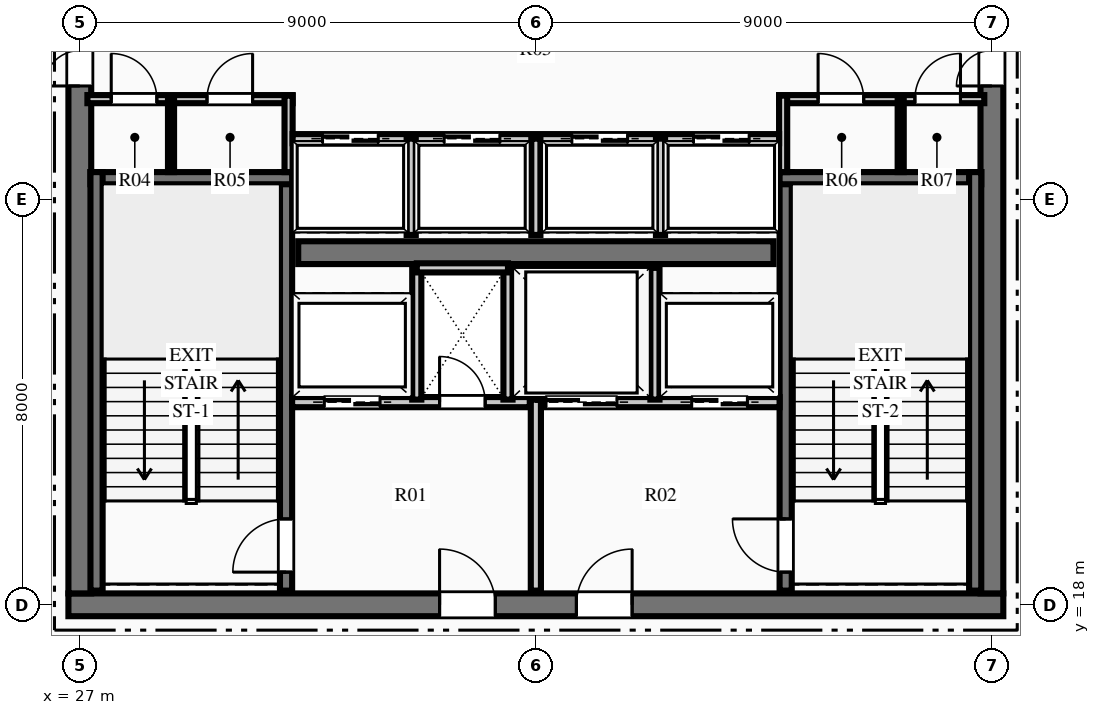
"""IFC4 building model, lengths in metres.
Left out: names, types, materials, properties, quantities, classifications, styles, units other than length and angle.
Written with IfcOpenShell. Run it as: python <this file> out.ifc"""

import sys

from ifc_helpers import new_model, si_unit, direction, frame, frame_2d, origin, place, context, subcontext, project, spatial, rectangle, extrude, element, fill, save


model = new_model("IFC4")
c1 = context("Model", 3, precision=1e-05, world=origin(), true_north=direction((0.0, 1.0)))
c2 = subcontext(c1, "Body", "Model", "MODEL_VIEW")
j1 = project(units=[si_unit("LENGTHUNIT", "METRE"), si_unit("PLANEANGLEUNIT", "RADIAN")], contexts=[c1])
p1 = place(None, origin())
s1 = spatial("IfcSite", under=j1, at=p1, CompositionType="ELEMENT")
p2 = place(p1, origin())
s2 = spatial("IfcBuilding", under=s1, at=p2, CompositionType="ELEMENT")
p3 = place(p2, frame((0.0, 0.0, 271.2)))
s3 = spatial("IfcBuildingStorey", under=s2, at=p3, CompositionType="ELEMENT", Elevation=271.2)
p4 = place(p3, frame((26.775, 18.0, 0.0), z_axis=(0.0, 0.0, 1.0), x_axis=(1.0, 0.0, 0.0)))
e1 = element("IfcWall", 1, at=p4, inside=s3, PredefinedType="SHEAR", context=c2, shape_type="SweptSolid", body=[
    extrude(rectangle(XDim=18.45, YDim=0.45, at=frame_2d((9.225, 0.0))), origin(), (0.0, 0.0, 1.0), 3.75),
])
p5 = place(p4, frame((7.325, 0.0, 0.0)))
e2 = element("IfcOpeningElement", 2, at=p5, cuts=e1, PredefinedType="OPENING", context=c2, shape_type="SweptSolid", body=[
    extrude(rectangle(XDim=1.1, YDim=2.15, at=frame_2d((0.55, 1.075))), frame((0.0, 0.235, 0.0), z_axis=(0.0, -1.0, 0.0), x_axis=(1.0, 0.0, 0.0)), (0.0, 0.0, 1.0), 0.47),
])
p6 = place(p4, frame((10.025, 0.0, 0.0)))
e3 = element("IfcOpeningElement", 3, at=p6, cuts=e1, PredefinedType="OPENING", context=c2, shape_type="SweptSolid", body=[
    extrude(rectangle(XDim=1.1, YDim=2.15, at=frame_2d((0.55, 1.075))), frame((0.0, 0.235, 0.0), z_axis=(0.0, -1.0, 0.0), x_axis=(1.0, 0.0, 0.0)), (0.0, 0.0, 1.0), 0.47),
])
p7 = place(p3, frame((27.0, 18.225, 0.0), z_axis=(0.0, 0.0, 1.0), x_axis=(0.0, 1.0, 0.0)))
e4 = element("IfcWall", 4, at=p7, inside=s3, PredefinedType="SHEAR", context=c2, shape_type="SweptSolid", body=[
    extrude(rectangle(XDim=15.55, YDim=0.45, at=frame_2d((7.775, 0.0))), origin(), (0.0, 0.0, 1.0), 3.75),
])
p8 = place(p7, frame((10.015, 0.0, 0.0)))
e5 = element("IfcOpeningElement", 5, at=p8, cuts=e4, PredefinedType="OPENING", context=c2, shape_type="SweptSolid", body=[
    extrude(rectangle(XDim=1.4, YDim=2.2, at=frame_2d((0.7, 1.1))), frame((0.0, 0.235, 0.0), z_axis=(0.0, -1.0, 0.0), x_axis=(1.0, 0.0, 0.0)), (0.0, 0.0, 1.0), 0.47),
])
p9 = place(p3, frame((45.0, 18.225, 0.0), z_axis=(0.0, 0.0, 1.0), x_axis=(0.0, 1.0, 0.0)))
e6 = element("IfcWall", 6, at=p9, inside=s3, PredefinedType="SHEAR", context=c2, shape_type="SweptSolid", body=[
    extrude(rectangle(XDim=15.55, YDim=0.45, at=frame_2d((7.775, 0.0))), origin(), (0.0, 0.0, 1.0), 3.75),
])
p10 = place(p9, frame((10.015, 0.0, 0.0)))
e7 = element("IfcOpeningElement", 7, at=p10, cuts=e6, PredefinedType="OPENING", context=c2, shape_type="SweptSolid", body=[
    extrude(rectangle(XDim=1.4, YDim=2.2, at=frame_2d((0.7, 1.1))), frame((0.0, 0.235, 0.0), z_axis=(0.0, -1.0, 0.0), x_axis=(1.0, 0.0, 0.0)), (0.0, 0.0, 1.0), 0.47),
])
p11 = place(p3, frame((31.31, 24.95, 0.0), z_axis=(0.0, 0.0, 1.0), x_axis=(1.0, 0.0, 0.0)))
e8 = element("IfcWall", 8, at=p11, inside=s3, PredefinedType="SHEAR", context=c2, shape_type="SweptSolid", body=[
    extrude(rectangle(XDim=9.38, YDim=0.45, at=frame_2d((4.69, 0.0))), origin(), (0.0, 0.0, 1.0), 3.75),
])
p12 = place(p3, frame((31.07, 18.28, 0.0), z_axis=(0.0, 0.0, 1.0), x_axis=(0.0, 1.0, 0.0)))
e9 = element("IfcWall", 9, at=p12, inside=s3, PredefinedType="SHEAR", context=c2, shape_type="SweptSolid", body=[
    extrude(rectangle(XDim=8.26, YDim=0.24, at=frame_2d((4.13, 0.0))), origin(), (0.0, 0.0, 1.0), 3.75),
])
p13 = place(p12, frame((0.365, 0.0, 0.0)))
e10 = element("IfcOpeningElement", 10, at=p13, cuts=e9, PredefinedType="OPENING", context=c2, shape_type="SweptSolid", body=[
    extrude(rectangle(XDim=1.05, YDim=2.15, at=frame_2d((0.525, 1.075))), frame((0.0, 0.13, 0.0), z_axis=(0.0, -1.0, 0.0), x_axis=(1.0, 0.0, 0.0)), (0.0, 0.0, 1.0), 0.26),
])
p14 = place(p3, frame((27.21, 26.42, 0.0), z_axis=(0.0, 0.0, 1.0), x_axis=(1.0, 0.0, 0.0)))
e11 = element("IfcWall", 11, at=p14, inside=s3, PredefinedType="SHEAR", context=c2, shape_type="SweptSolid", body=[
    extrude(rectangle(XDim=3.98, YDim=0.24, at=frame_2d((1.99, 0.0))), origin(), (0.0, 0.0, 1.0), 3.75),
])
p15 = place(p3, frame((27.33, 18.28, 0.0), z_axis=(0.0, 0.0, 1.0), x_axis=(0.0, 1.0, 0.0)))
e12 = element("IfcWall", 12, at=p15, inside=s3, PredefinedType="SHEAR", context=c2, shape_type="SweptSolid", body=[
    extrude(rectangle(XDim=8.26, YDim=0.24, at=frame_2d((4.13, 0.0))), origin(), (0.0, 0.0, 1.0), 3.75),
])
p16 = place(p3, frame((40.93, 18.28, 0.0), z_axis=(0.0, 0.0, 1.0), x_axis=(0.0, 1.0, 0.0)))
e13 = element("IfcWall", 13, at=p16, inside=s3, PredefinedType="SHEAR", context=c2, shape_type="SweptSolid", body=[
    extrude(rectangle(XDim=8.26, YDim=0.24, at=frame_2d((4.13, 0.0))), origin(), (0.0, 0.0, 1.0), 3.75),
])
p17 = place(p16, frame((0.365, 0.0, 0.0)))
e14 = element("IfcOpeningElement", 14, at=p17, cuts=e13, PredefinedType="OPENING", context=c2, shape_type="SweptSolid", body=[
    extrude(rectangle(XDim=1.05, YDim=2.15, at=frame_2d((0.525, 1.075))), frame((0.0, 0.13, 0.0), z_axis=(0.0, -1.0, 0.0), x_axis=(1.0, 0.0, 0.0)), (0.0, 0.0, 1.0), 0.26),
])
p18 = place(p3, frame((40.81, 26.42, 0.0), z_axis=(0.0, 0.0, 1.0), x_axis=(1.0, 0.0, 0.0)))
e15 = element("IfcWall", 15, at=p18, inside=s3, PredefinedType="SHEAR", context=c2, shape_type="SweptSolid", body=[
    extrude(rectangle(XDim=3.98, YDim=0.24, at=frame_2d((1.99, 0.0))), origin(), (0.0, 0.0, 1.0), 3.75),
])
p19 = place(p3, frame((44.67, 18.28, 0.0), z_axis=(0.0, 0.0, 1.0), x_axis=(0.0, 1.0, 0.0)))
e16 = element("IfcWall", 16, at=p19, inside=s3, PredefinedType="SHEAR", context=c2, shape_type="SweptSolid", body=[
    extrude(rectangle(XDim=8.26, YDim=0.24, at=frame_2d((4.13, 0.0))), origin(), (0.0, 0.0, 1.0), 3.75),
])
p20 = place(p3, frame((36.0, 18.28, 0.0), z_axis=(0.0, 0.0, 1.0), x_axis=(0.0, 1.0, 0.0)))
e17 = element("IfcWall", 17, at=p20, inside=s3, PredefinedType="PARTITIONING", context=c2, shape_type="SweptSolid", body=[
    extrude(rectangle(XDim=3.77, YDim=0.2, at=frame_2d((1.885, 0.0))), origin(), (0.0, 0.0, 1.0), 3.48),
])
p21 = place(p3, frame((31.19, 22.0, 0.0), z_axis=(0.0, 0.0, 1.0), x_axis=(1.0, 0.0, 0.0)))
e18 = element("IfcWall", 18, at=p21, inside=s3, PredefinedType="PARTITIONING", context=c2, shape_type="SweptSolid", body=[
    extrude(rectangle(XDim=4.69, YDim=0.2, at=frame_2d((2.345, 0.0))), origin(), (0.0, 0.0, 1.0), 3.48),
])
p22 = place(p21, frame((2.91, 0.0, 0.0)))
e19 = element("IfcOpeningElement", 19, at=p22, cuts=e18, PredefinedType="OPENING", context=c2, shape_type="SweptSolid", body=[
    extrude(rectangle(XDim=0.9, YDim=2.15, at=frame_2d((0.45, 1.075))), frame((0.0, 0.11, 0.0), z_axis=(0.0, -1.0, 0.0), x_axis=(1.0, 0.0, 0.0)), (0.0, 0.0, 1.0), 0.22),
])
p23 = place(p21, frame((0.635, 0.0, 0.0)))
e20 = element("IfcOpeningElement", 20, at=p23, cuts=e18, PredefinedType="OPENING", context=c2, shape_type="SweptSolid", body=[
    extrude(rectangle(XDim=1.1, YDim=2.15, at=frame_2d((0.55, 1.075))), frame((0.0, 0.11, 0.0), z_axis=(0.0, -1.0, 0.0), x_axis=(1.0, 0.0, 0.0)), (0.0, 0.0, 1.0), 0.22),
])
p24 = place(p3, frame((36.12, 22.0, 0.0), z_axis=(0.0, 0.0, 1.0), x_axis=(1.0, 0.0, 0.0)))
e21 = element("IfcWall", 21, at=p24, inside=s3, PredefinedType="PARTITIONING", context=c2, shape_type="SweptSolid", body=[
    extrude(rectangle(XDim=4.69, YDim=0.2, at=frame_2d((2.345, 0.0))), origin(), (0.0, 0.0, 1.0), 3.48),
])
p25 = place(p24, frame((2.955, 0.0, 0.0)))
e22 = element("IfcOpeningElement", 22, at=p25, cuts=e21, PredefinedType="OPENING", context=c2, shape_type="SweptSolid", body=[
    extrude(rectangle(XDim=1.1, YDim=2.15, at=frame_2d((0.55, 1.075))), frame((0.0, 0.11, 0.0), z_axis=(0.0, -1.0, 0.0), x_axis=(1.0, 0.0, 0.0)), (0.0, 0.0, 1.0), 0.22),
])
p26 = place(p24, frame((0.08, 0.0, 0.0)))
e23 = element("IfcOpeningElement", 23, at=p26, cuts=e21, PredefinedType="OPENING", context=c2, shape_type="SweptSolid", body=[
    extrude(rectangle(XDim=1.4, YDim=2.2, at=frame_2d((0.7, 1.1))), frame((0.0, 0.11, 0.0), z_axis=(0.0, -1.0, 0.0), x_axis=(1.0, 0.0, 0.0)), (0.0, 0.0, 1.0), 0.22),
])
for number, where, z_axis, x_axis in (
    (24, (33.65, 22.05, 0.0), (0.0, 0.0, 1.0), (0.0, 1.0, 0.0)),
    (25, (35.45, 22.05, 0.0), (0.0, 0.0, 1.0), (0.0, 1.0, 0.0)),
):
    element("IfcWall", number, at=place(p3, frame(where, z_axis=z_axis, x_axis=x_axis)), inside=s3, PredefinedType="PARTITIONING", context=c2, shape_type="SweptSolid", body=[
        extrude(rectangle(XDim=2.6, YDim=0.18, at=frame_2d((1.3, 0.0))), origin(), (0.0, 0.0, 1.0), 3.48),
    ])
p27 = place(p3, frame((33.65, 24.65, 0.0), z_axis=(0.0, 0.0, 1.0), x_axis=(1.0, 0.0, 0.0)))
e26 = element("IfcWall", 26, at=p27, inside=s3, PredefinedType="PARTITIONING", context=c2, shape_type="SweptSolid", body=[
    extrude(rectangle(XDim=1.8, YDim=0.18, at=frame_2d((0.9, 0.0))), origin(), (0.0, 0.0, 1.0), 3.48),
])
p28 = place(p3, frame((38.35, 22.05, 0.0), z_axis=(0.0, 0.0, 1.0), x_axis=(0.0, 1.0, 0.0)))
e27 = element("IfcWall", 27, at=p28, inside=s3, PredefinedType="PARTITIONING", context=c2, shape_type="SweptSolid", body=[
    extrude(rectangle(XDim=2.6, YDim=0.18, at=frame_2d((1.3, 0.0))), origin(), (0.0, 0.0, 1.0), 3.48),
])
p29 = place(p3, frame((27.15, 27.98, 0.0), z_axis=(0.0, 0.0, 1.0), x_axis=(1.0, 0.0, 0.0)))
e28 = element("IfcWall", 28, at=p29, inside=s3, PredefinedType="PARTITIONING", context=c2, shape_type="SweptSolid", body=[
    extrude(rectangle(XDim=4.05, YDim=0.16, at=frame_2d((2.025, 0.0))), origin(), (0.0, 0.0, 1.0), 3.48),
])
p30 = place(p29, frame((0.47, 0.0, 0.0)))
e29 = element("IfcOpeningElement", 29, at=p30, cuts=e28, PredefinedType="OPENING", context=c2, shape_type="SweptSolid", body=[
    extrude(rectangle(XDim=0.9, YDim=2.15, at=frame_2d((0.45, 1.075))), frame((0.0, 0.09, 0.0), z_axis=(0.0, -1.0, 0.0), x_axis=(1.0, 0.0, 0.0)), (0.0, 0.0, 1.0), 0.18),
])
p31 = place(p29, frame((2.36, 0.0, 0.0)))
e30 = element("IfcOpeningElement", 30, at=p31, cuts=e28, PredefinedType="OPENING", context=c2, shape_type="SweptSolid", body=[
    extrude(rectangle(XDim=0.9, YDim=2.15, at=frame_2d((0.45, 1.075))), frame((0.0, 0.09, 0.0), z_axis=(0.0, -1.0, 0.0), x_axis=(1.0, 0.0, 0.0)), (0.0, 0.0, 1.0), 0.18),
])
p32 = place(p3, frame((31.12, 26.54, 0.0), z_axis=(0.0, 0.0, 1.0), x_axis=(0.0, 1.0, 0.0)))
e31 = element("IfcWall", 31, at=p32, inside=s3, PredefinedType="PARTITIONING", context=c2, shape_type="SweptSolid", body=[
    extrude(rectangle(XDim=1.51, YDim=0.16, at=frame_2d((0.755, 0.0))), origin(), (0.0, 0.0, 1.0), 3.48),
])
p33 = place(p3, frame((40.8, 27.98, 0.0), z_axis=(0.0, 0.0, 1.0), x_axis=(1.0, 0.0, 0.0)))
e32 = element("IfcWall", 32, at=p33, inside=s3, PredefinedType="PARTITIONING", context=c2, shape_type="SweptSolid", body=[
    extrude(rectangle(XDim=4.05, YDim=0.16, at=frame_2d((2.025, 0.0))), origin(), (0.0, 0.0, 1.0), 3.48),
])
p34 = place(p33, frame((0.77, 0.0, 0.0)))
e33 = element("IfcOpeningElement", 33, at=p34, cuts=e32, PredefinedType="OPENING", context=c2, shape_type="SweptSolid", body=[
    extrude(rectangle(XDim=0.9, YDim=2.15, at=frame_2d((0.45, 1.075))), frame((0.0, 0.09, 0.0), z_axis=(0.0, -1.0, 0.0), x_axis=(1.0, 0.0, 0.0)), (0.0, 0.0, 1.0), 0.18),
])
p35 = place(p33, frame((2.68, 0.0, 0.0)))
e34 = element("IfcOpeningElement", 34, at=p35, cuts=e32, PredefinedType="OPENING", context=c2, shape_type="SweptSolid", body=[
    extrude(rectangle(XDim=0.9, YDim=2.15, at=frame_2d((0.45, 1.075))), frame((0.0, 0.09, 0.0), z_axis=(0.0, -1.0, 0.0), x_axis=(1.0, 0.0, 0.0)), (0.0, 0.0, 1.0), 0.18),
])
p36 = place(p3, frame((40.88, 26.54, 0.0), z_axis=(0.0, 0.0, 1.0), x_axis=(0.0, 1.0, 0.0)))
e35 = element("IfcWall", 35, at=p36, inside=s3, PredefinedType="PARTITIONING", context=c2, shape_type="SweptSolid", body=[
    extrude(rectangle(XDim=1.51, YDim=0.16, at=frame_2d((0.755, 0.0))), origin(), (0.0, 0.0, 1.0), 3.48),
])
for number, where, z_axis, x_axis in (
    (36, (28.8, 26.54, 0.0), (0.0, 0.0, 1.0), (0.0, 1.0, 0.0)),
    (37, (43.2, 26.54, 0.0), (0.0, 0.0, 1.0), (0.0, 1.0, 0.0)),
):
    element("IfcWall", number, at=place(p3, frame(where, z_axis=z_axis, x_axis=x_axis)), inside=s3, PredefinedType="PARTITIONING", context=c2, shape_type="SweptSolid", body=[
        extrude(rectangle(XDim=1.44, YDim=0.12, at=frame_2d((0.72, 0.0))), origin(), (0.0, 0.0, 1.0), 3.48),
    ])
p37 = place(p3, frame((31.2, 27.2, 0.0), z_axis=(0.0, 0.0, 1.0), x_axis=(1.0, 0.0, 0.0)))
e38 = element("IfcWall", 38, at=p37, inside=s3, PredefinedType="PARTITIONING", context=c2, shape_type="SweptSolid", body=[
    extrude(rectangle(XDim=9.6, YDim=0.18, at=frame_2d((4.8, 0.0))), origin(), (0.0, 0.0, 1.0), 3.48),
])
p38 = place(p37, frame((0.59, 0.0, 0.0)))
e39 = element("IfcOpeningElement", 39, at=p38, cuts=e38, PredefinedType="OPENING", context=c2, shape_type="SweptSolid", body=[
    extrude(rectangle(XDim=1.1, YDim=2.15, at=frame_2d((0.55, 1.075))), frame((0.0, 0.1, 0.0), z_axis=(0.0, -1.0, 0.0), x_axis=(1.0, 0.0, 0.0)), (0.0, 0.0, 1.0), 0.2),
])
p39 = place(p37, frame((2.99, 0.0, 0.0)))
e40 = element("IfcOpeningElement", 40, at=p39, cuts=e38, PredefinedType="OPENING", context=c2, shape_type="SweptSolid", body=[
    extrude(rectangle(XDim=1.1, YDim=2.15, at=frame_2d((0.55, 1.075))), frame((0.0, 0.1, 0.0), z_axis=(0.0, -1.0, 0.0), x_axis=(1.0, 0.0, 0.0)), (0.0, 0.0, 1.0), 0.2),
])
p40 = place(p37, frame((5.51, 0.0, 0.0)))
e41 = element("IfcOpeningElement", 41, at=p40, cuts=e38, PredefinedType="OPENING", context=c2, shape_type="SweptSolid", body=[
    extrude(rectangle(XDim=1.1, YDim=2.15, at=frame_2d((0.55, 1.075))), frame((0.0, 0.1, 0.0), z_axis=(0.0, -1.0, 0.0), x_axis=(1.0, 0.0, 0.0)), (0.0, 0.0, 1.0), 0.2),
])
p41 = place(p37, frame((7.91, 0.0, 0.0)))
e42 = element("IfcOpeningElement", 42, at=p41, cuts=e38, PredefinedType="OPENING", context=c2, shape_type="SweptSolid", body=[
    extrude(rectangle(XDim=1.1, YDim=2.15, at=frame_2d((0.55, 1.075))), frame((0.0, 0.1, 0.0), z_axis=(0.0, -1.0, 0.0), x_axis=(1.0, 0.0, 0.0)), (0.0, 0.0, 1.0), 0.2),
])
for number, where, z_axis, x_axis in (
    (43, (33.54, 25.3, 0.0), (0.0, 0.0, 1.0), (0.0, 1.0, 0.0)),
    (44, (36.0, 25.3, 0.0), (0.0, 0.0, 1.0), (0.0, 1.0, 0.0)),
    (45, (38.46, 25.3, 0.0), (0.0, 0.0, 1.0), (0.0, 1.0, 0.0)),
):
    element("IfcWall", number, at=place(p3, frame(where, z_axis=z_axis, x_axis=x_axis)), inside=s3, PredefinedType="PARTITIONING", context=c2, shape_type="SweptSolid", body=[
        extrude(rectangle(XDim=1.9, YDim=0.18, at=frame_2d((0.95, 0.0))), origin(), (0.0, 0.0, 1.0), 3.48),
    ])
p42 = place(p30, origin())
e46 = element("IfcDoor", 46, at=p42, inside=s3, OperationType="SINGLE_SWING_LEFT", PredefinedType="DOOR", context=c2, shape_type="SweptSolid", body=[
    extrude(rectangle(XDim=0.9, YDim=2.15, at=frame_2d((0.45, 1.075))), frame((0.0, 0.025, 0.0), z_axis=(0.0, -1.0, 0.0), x_axis=(1.0, 0.0, 0.0)), (0.0, 0.0, 1.0), 0.05),
])
fill(e29, e46)
p43 = place(p31, origin())
e47 = element("IfcDoor", 47, at=p43, inside=s3, OperationType="SINGLE_SWING_RIGHT", PredefinedType="DOOR", context=c2, shape_type="SweptSolid", body=[
    extrude(rectangle(XDim=0.9, YDim=2.15, at=frame_2d((0.45, 1.075))), frame((0.0, 0.025, 0.0), z_axis=(0.0, -1.0, 0.0), x_axis=(1.0, 0.0, 0.0)), (0.0, 0.0, 1.0), 0.05),
])
fill(e30, e47)
p44 = place(p34, origin())
e48 = element("IfcDoor", 48, at=p44, inside=s3, OperationType="SINGLE_SWING_LEFT", PredefinedType="DOOR", context=c2, shape_type="SweptSolid", body=[
    extrude(rectangle(XDim=0.9, YDim=2.15, at=frame_2d((0.45, 1.075))), frame((0.0, 0.025, 0.0), z_axis=(0.0, -1.0, 0.0), x_axis=(1.0, 0.0, 0.0)), (0.0, 0.0, 1.0), 0.05),
])
fill(e33, e48)
p45 = place(p35, origin())
e49 = element("IfcDoor", 49, at=p45, inside=s3, OperationType="SINGLE_SWING_RIGHT", PredefinedType="DOOR", context=c2, shape_type="SweptSolid", body=[
    extrude(rectangle(XDim=0.9, YDim=2.15, at=frame_2d((0.45, 1.075))), frame((0.0, 0.025, 0.0), z_axis=(0.0, -1.0, 0.0), x_axis=(1.0, 0.0, 0.0)), (0.0, 0.0, 1.0), 0.05),
])
fill(e34, e49)
p46 = place(p13, origin())
e50 = element("IfcDoor", 50, at=p46, inside=s3, OperationType="SINGLE_SWING_LEFT", PredefinedType="DOOR", context=c2, shape_type="SweptSolid", body=[
    extrude(rectangle(XDim=1.05, YDim=2.15, at=frame_2d((0.525, 1.075))), frame((0.0, 0.025, 0.0), z_axis=(0.0, -1.0, 0.0), x_axis=(1.0, 0.0, 0.0)), (0.0, 0.0, 1.0), 0.05),
])
fill(e10, e50)
p47 = place(p17, origin())
e51 = element("IfcDoor", 51, at=p47, inside=s3, OperationType="SINGLE_SWING_RIGHT", PredefinedType="DOOR", context=c2, shape_type="SweptSolid", body=[
    extrude(rectangle(XDim=1.05, YDim=2.15, at=frame_2d((0.525, 1.075))), frame((0.0, 0.025, 0.0), z_axis=(0.0, -1.0, 0.0), x_axis=(1.0, 0.0, 0.0)), (0.0, 0.0, 1.0), 0.05),
])
fill(e14, e51)
p48 = place(p5, origin())
e52 = element("IfcDoor", 52, at=p48, inside=s3, OperationType="SINGLE_SWING_LEFT", PredefinedType="DOOR", context=c2, shape_type="SweptSolid", body=[
    extrude(rectangle(XDim=1.1, YDim=2.15, at=frame_2d((0.55, 1.075))), frame((0.0, 0.025, 0.0), z_axis=(0.0, -1.0, 0.0), x_axis=(1.0, 0.0, 0.0)), (0.0, 0.0, 1.0), 0.05),
])
fill(e2, e52)
p49 = place(p6, origin())
e53 = element("IfcDoor", 53, at=p49, inside=s3, OperationType="SINGLE_SWING_RIGHT", PredefinedType="DOOR", context=c2, shape_type="SweptSolid", body=[
    extrude(rectangle(XDim=1.1, YDim=2.15, at=frame_2d((0.55, 1.075))), frame((0.0, 0.025, 0.0), z_axis=(0.0, -1.0, 0.0), x_axis=(1.0, 0.0, 0.0)), (0.0, 0.0, 1.0), 0.05),
])
fill(e3, e53)
p50 = place(p22, origin())
e54 = element("IfcDoor", 54, at=p50, inside=s3, OperationType="SINGLE_SWING_LEFT", PredefinedType="DOOR", context=c2, shape_type="SweptSolid", body=[
    extrude(rectangle(XDim=0.9, YDim=2.15, at=frame_2d((0.45, 1.075))), frame((0.0, 0.025, 0.0), z_axis=(0.0, -1.0, 0.0), x_axis=(1.0, 0.0, 0.0)), (0.0, 0.0, 1.0), 0.05),
])
fill(e19, e54)
p51 = place(p8, origin())
e55 = element("IfcDoor", 55, at=p51, inside=s3, OperationType="DOUBLE_DOOR_SINGLE_SWING", PredefinedType="DOOR", context=c2, shape_type="SweptSolid", body=[
    extrude(rectangle(XDim=1.4, YDim=2.2, at=frame_2d((0.7, 1.1))), frame((0.0, 0.025, 0.0), z_axis=(0.0, -1.0, 0.0), x_axis=(1.0, 0.0, 0.0)), (0.0, 0.0, 1.0), 0.05),
])
fill(e5, e55)
p52 = place(p10, origin())
e56 = element("IfcDoor", 56, at=p52, inside=s3, OperationType="DOUBLE_DOOR_SINGLE_SWING", PredefinedType="DOOR", context=c2, shape_type="SweptSolid", body=[
    extrude(rectangle(XDim=1.4, YDim=2.2, at=frame_2d((0.7, 1.1))), frame((0.0, 0.025, 0.0), z_axis=(0.0, -1.0, 0.0), x_axis=(1.0, 0.0, 0.0)), (0.0, 0.0, 1.0), 0.05),
])
fill(e7, e56)
p53 = place(p38, origin())
e57 = element("IfcDoor", 57, at=p53, inside=s3, OperationType="SLIDING_TO_LEFT", PredefinedType="DOOR", context=c2, shape_type="SweptSolid", body=[
    extrude(rectangle(XDim=1.1, YDim=2.15, at=frame_2d((0.55, 1.075))), frame((0.0, 0.025, 0.0), z_axis=(0.0, -1.0, 0.0), x_axis=(1.0, 0.0, 0.0)), (0.0, 0.0, 1.0), 0.05),
])
fill(e39, e57)
p54 = place(p39, origin())
e58 = element("IfcDoor", 58, at=p54, inside=s3, OperationType="SLIDING_TO_LEFT", PredefinedType="DOOR", context=c2, shape_type="SweptSolid", body=[
    extrude(rectangle(XDim=1.1, YDim=2.15, at=frame_2d((0.55, 1.075))), frame((0.0, 0.025, 0.0), z_axis=(0.0, -1.0, 0.0), x_axis=(1.0, 0.0, 0.0)), (0.0, 0.0, 1.0), 0.05),
])
fill(e40, e58)
p55 = place(p40, origin())
e59 = element("IfcDoor", 59, at=p55, inside=s3, OperationType="SLIDING_TO_LEFT", PredefinedType="DOOR", context=c2, shape_type="SweptSolid", body=[
    extrude(rectangle(XDim=1.1, YDim=2.15, at=frame_2d((0.55, 1.075))), frame((0.0, 0.025, 0.0), z_axis=(0.0, -1.0, 0.0), x_axis=(1.0, 0.0, 0.0)), (0.0, 0.0, 1.0), 0.05),
])
fill(e41, e59)
p56 = place(p41, origin())
e60 = element("IfcDoor", 60, at=p56, inside=s3, OperationType="SLIDING_TO_LEFT", PredefinedType="DOOR", context=c2, shape_type="SweptSolid", body=[
    extrude(rectangle(XDim=1.1, YDim=2.15, at=frame_2d((0.55, 1.075))), frame((0.0, 0.025, 0.0), z_axis=(0.0, -1.0, 0.0), x_axis=(1.0, 0.0, 0.0)), (0.0, 0.0, 1.0), 0.05),
])
fill(e42, e60)
p57 = place(p23, origin())
e61 = element("IfcDoor", 61, at=p57, inside=s3, OperationType="SLIDING_TO_LEFT", PredefinedType="DOOR", context=c2, shape_type="SweptSolid", body=[
    extrude(rectangle(XDim=1.1, YDim=2.15, at=frame_2d((0.55, 1.075))), frame((0.0, 0.025, 0.0), z_axis=(0.0, -1.0, 0.0), x_axis=(1.0, 0.0, 0.0)), (0.0, 0.0, 1.0), 0.05),
])
fill(e20, e61)
p58 = place(p25, origin())
e62 = element("IfcDoor", 62, at=p58, inside=s3, OperationType="SLIDING_TO_LEFT", PredefinedType="DOOR", context=c2, shape_type="SweptSolid", body=[
    extrude(rectangle(XDim=1.1, YDim=2.15, at=frame_2d((0.55, 1.075))), frame((0.0, 0.025, 0.0), z_axis=(0.0, -1.0, 0.0), x_axis=(1.0, 0.0, 0.0)), (0.0, 0.0, 1.0), 0.05),
])
fill(e22, e62)
p59 = place(p26, origin())
e63 = element("IfcDoor", 63, at=p59, inside=s3, OperationType="SLIDING_TO_LEFT", PredefinedType="DOOR", context=c2, shape_type="SweptSolid", body=[
    extrude(rectangle(XDim=1.4, YDim=2.2, at=frame_2d((0.7, 1.1))), frame((0.0, 0.025, 0.0), z_axis=(0.0, -1.0, 0.0), x_axis=(1.0, 0.0, 0.0)), (0.0, 0.0, 1.0), 0.05),
])
fill(e23, e63)
save(model, sys.argv[1])
